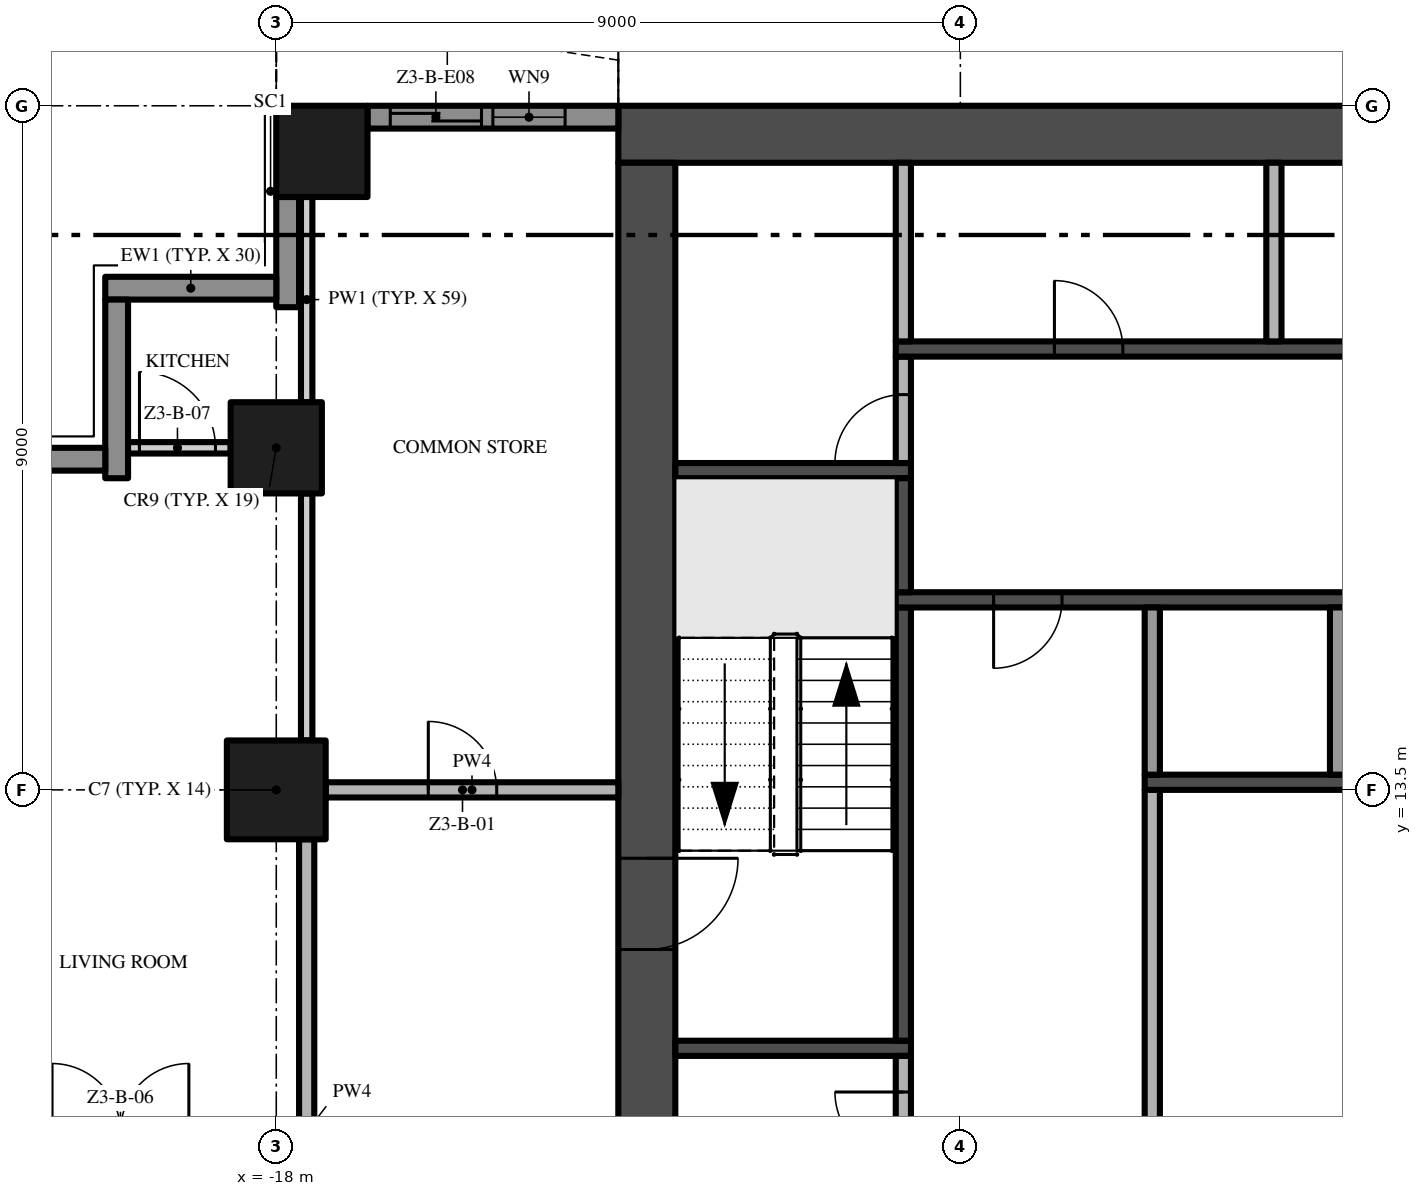
"""IFC4 building model, lengths in metres.
Left out: names, types, materials, properties, quantities, classifications, styles, units other than length and angle.
Written with IfcOpenShell. Run it as: python <this file> out.ifc"""

import sys

from ifc_helpers import new_model, si_unit, direction, frame, frame_2d, origin, origin_2d, place, context, subcontext, project, spatial, polyline, rectangle, outline, extrude, element, fill, save


model = new_model("IFC4")
c1 = context("Model", 3, precision=1e-05, world=origin(), true_north=direction((0.0, 1.0)))
c2 = subcontext(c1, "Body", "Model", "MODEL_VIEW")
j1 = project(units=[si_unit("LENGTHUNIT", "METRE"), si_unit("PLANEANGLEUNIT", "RADIAN")], contexts=[c1])
p1 = place(None, origin())
s1 = spatial("IfcSite", under=j1, at=p1, CompositionType="ELEMENT")
p2 = place(p1, origin())
s2 = spatial("IfcBuilding", under=s1, at=p2, CompositionType="ELEMENT")
p3 = place(p2, frame((0.0, 0.0, 136.4)))
s3 = spatial("IfcBuildingStorey", under=s2, at=p3, CompositionType="ELEMENT", Elevation=136.4)
p4 = place(p3, frame((13.5, 22.125, -0.3), z_axis=(0.0, 0.0, 1.0), x_axis=(-1.0, 0.0, 0.0)))
e1 = element("IfcWall", 1, at=p4, inside=s3, PredefinedType="SHEAR", context=c2, shape_type="SweptSolid", body=[
    extrude(rectangle(XDim=27.0, YDim=0.75, at=frame_2d((13.5, 0.0))), origin(), (0.0, 0.0, 1.0), 3.8),
])
p5 = place(p3, frame((-13.125, 21.75, -0.3), z_axis=(0.0, 0.0, 1.0), x_axis=(0.0, -1.0, 0.0)))
e2 = element("IfcWall", 2, at=p5, inside=s3, PredefinedType="SHEAR", context=c2, shape_type="SweptSolid", body=[
    extrude(rectangle(XDim=16.5, YDim=0.75, at=frame_2d((8.25, 0.0))), origin(), (0.0, 0.0, 1.0), 3.8),
])
p6 = place(p5, frame((9.15, 0.0, 0.3)))
e3 = element("IfcOpeningElement", 3, at=p6, cuts=e2, PredefinedType="OPENING", context=c2, shape_type="SweptSolid", body=[
    extrude(rectangle(XDim=1.2, YDim=2.2, at=frame_2d((0.6, 1.1))), frame((0.0, 0.385, 0.0), z_axis=(0.0, -1.0, 0.0), x_axis=(1.0, 0.0, 0.0)), (0.0, 0.0, 1.0), 0.77),
])
p7 = place(p3, frame((-18.0, 13.5, 0.0), z_axis=(0.0, 0.0, 1.0), x_axis=(1.0, 0.0, 0.0)))
e4 = element("IfcColumn", 4, at=p7, inside=s3, PredefinedType="COLUMN", context=c2, shape_type="SweptSolid", body=[
    extrude(rectangle(XDim=1.3, YDim=1.3, at=origin_2d()), origin(), (0.0, 0.0, 1.0), 3.5),
])
for number, where, z_axis, x_axis in (
    (5, (-17.4, 21.9, 0.0), (0.0, 0.0, 1.0), (1.0, 0.0, 0.0)),
    (6, (-18.0, 18.0, 0.0), (0.0, 0.0, 1.0), (1.0, 0.0, 0.0)),
):
    element("IfcColumn", number, at=place(p3, frame(where, z_axis=z_axis, x_axis=x_axis)), inside=s3, PredefinedType="COLUMN", context=c2, shape_type="SweptSolid", body=[
        extrude(rectangle(XDim=1.2, YDim=1.2, at=origin_2d()), origin(), (0.0, 0.0, 1.0), 3.5),
    ])
p8 = place(p3, frame((-16.8, 22.35, 0.0), z_axis=(0.0, 0.0, 1.0), x_axis=(1.0, 0.0, 0.0)))
e7 = element("IfcWall", 7, at=p8, inside=s3, PredefinedType="SOLIDWALL", context=c2, shape_type="SweptSolid", body=[
    extrude(rectangle(XDim=3.3, YDim=0.3, at=frame_2d((1.65, 0.0))), origin(), (0.0, 0.0, 1.0), 3.5),
])
p9 = place(p8, frame((1.65, 0.0, 0.45)))
e8 = element("IfcOpeningElement", 8, at=p9, cuts=e7, PredefinedType="OPENING", context=c2, shape_type="SweptSolid", body=[
    extrude(rectangle(XDim=0.95, YDim=2.65, at=frame_2d((0.475, 1.325))), frame((0.0, 0.16, 0.0), z_axis=(0.0, -1.0, 0.0), x_axis=(1.0, 0.0, 0.0)), (0.0, 0.0, 1.0), 0.32),
])
p10 = place(p8, frame((0.3, 0.0, 0.0)))
e9 = element("IfcOpeningElement", 9, at=p10, cuts=e7, PredefinedType="OPENING", context=c2, shape_type="SweptSolid", body=[
    extrude(rectangle(XDim=1.2, YDim=2.4, at=frame_2d((0.6, 1.2))), frame((0.0, 0.16, 0.0), z_axis=(0.0, -1.0, 0.0), x_axis=(1.0, 0.0, 0.0)), (0.0, 0.0, 1.0), 0.32),
])
p11 = place(p3, frame((-17.85, 19.85, 0.0), z_axis=(0.0, 0.0, 1.0), x_axis=(0.0, 1.0, 0.0)))
e10 = element("IfcWall", 10, at=p11, inside=s3, PredefinedType="SOLIDWALL", context=c2, shape_type="SweptSolid", body=[
    extrude(rectangle(XDim=1.45, YDim=0.3, at=frame_2d((0.725, 0.0))), origin(), (0.0, 0.0, 1.0), 3.5),
])
p12 = place(p3, frame((-20.25, 20.1, 0.0), z_axis=(0.0, 0.0, 1.0), x_axis=(1.0, 0.0, 0.0)))
e11 = element("IfcWall", 11, at=p12, inside=s3, PredefinedType="SOLIDWALL", context=c2, shape_type="SweptSolid", body=[
    extrude(rectangle(XDim=2.25, YDim=0.3, at=frame_2d((1.125, 0.0))), origin(), (0.0, 0.0, 1.0), 3.5),
])
p13 = place(p3, frame((-20.1, 17.6, 0.0), z_axis=(0.0, 0.0, 1.0), x_axis=(0.0, 1.0, 0.0)))
e12 = element("IfcWall", 12, at=p13, inside=s3, PredefinedType="SOLIDWALL", context=c2, shape_type="SweptSolid", body=[
    extrude(rectangle(XDim=2.35, YDim=0.3, at=frame_2d((1.175, 0.0))), origin(), (0.0, 0.0, 1.0), 3.5),
])
p14 = place(p3, frame((-22.5, 17.85, 0.0), z_axis=(0.0, 0.0, 1.0), x_axis=(1.0, 0.0, 0.0)))
e13 = element("IfcWall", 13, at=p14, inside=s3, PredefinedType="SOLIDWALL", context=c2, shape_type="SweptSolid", body=[
    extrude(rectangle(XDim=2.25, YDim=0.3, at=frame_2d((1.125, 0.0))), origin(), (0.0, 0.0, 1.0), 3.5),
])
p15 = place(p3, origin())
e14 = element("IfcWall", 14, at=p15, inside=s3, PredefinedType="USERDEFINED", context=c2, shape_type="SweptSolid", body=[
    extrude(outline(polyline([(-13.5, 23.1), (-15.0, 23.329), (-16.5, 23.929), (-18.0, 24.671), (-18.111, 24.447), (-16.602, 23.701), (-15.066, 23.086), (-13.538, 22.853), (-13.5, 23.1)])), origin(), (0.0, 0.0, 1.0), 0.9),
])
for number, where, z_axis, x_axis in (
    (15, (-12.75, 10.1, 0.0), (0.0, 0.0, 1.0), (1.0, 0.0, 0.0)),
    (16, (-12.75, 17.7, 0.0), (0.0, 0.0, 1.0), (1.0, 0.0, 0.0)),
):
    element("IfcWall", number, at=place(p3, frame(where, z_axis=z_axis, x_axis=x_axis)), inside=s3, PredefinedType="SHEAR", context=c2, shape_type="SweptSolid", body=[
        extrude(rectangle(XDim=3.1, YDim=0.2, at=frame_2d((1.55, 0.0))), origin(), (0.0, 0.0, 1.0), 3.5),
    ])
p16 = place(p3, frame((-9.75, 8.15, 0.0), z_axis=(0.0, 0.0, 1.0), x_axis=(0.0, 1.0, 0.0)))
e17 = element("IfcWall", 17, at=p16, inside=s3, PredefinedType="PARTITIONING", context=c2, shape_type="SweptSolid", body=[
    extrude(rectangle(XDim=1.85, YDim=0.2, at=frame_2d((0.925, 0.0))), origin(), (0.0, 0.0, 1.0), 3.5),
])
p17 = place(p16, frame((0.475, 0.0, 0.0)))
e18 = element("IfcOpeningElement", 18, at=p17, cuts=e17, PredefinedType="OPENING", context=c2, shape_type="SweptSolid", body=[
    extrude(rectangle(XDim=0.9, YDim=2.1, at=frame_2d((0.45, 1.05))), frame((0.0, 0.11, 0.0), z_axis=(0.0, -1.0, 0.0), x_axis=(1.0, 0.0, 0.0)), (0.0, 0.0, 1.0), 0.22),
])
p18 = place(p3, frame((-9.75, 10.2, 0.0), z_axis=(0.0, 0.0, 1.0), x_axis=(0.0, 1.0, 0.0)))
e19 = element("IfcWall", 19, at=p18, inside=s3, PredefinedType="SHEAR", context=c2, shape_type="SweptSolid", body=[
    extrude(rectangle(XDim=5.7, YDim=0.2, at=frame_2d((2.85, 0.0))), origin(), (0.0, 0.0, 1.0), 3.5),
])
p19 = place(p3, frame((-1.5, 16.0, 0.0), z_axis=(0.0, 0.0, 1.0), x_axis=(-1.0, 0.0, 0.0)))
e20 = element("IfcWall", 20, at=p19, inside=s3, PredefinedType="SHEAR", context=c2, shape_type="SweptSolid", body=[
    extrude(rectangle(XDim=8.35, YDim=0.2, at=frame_2d((4.175, 0.0))), origin(), (0.0, 0.0, 1.0), 3.5),
])
p20 = place(p19, frame((6.162, 0.0, 0.0)))
e21 = element("IfcOpeningElement", 21, at=p20, cuts=e20, PredefinedType="OPENING", context=c2, shape_type="SweptSolid", body=[
    extrude(rectangle(XDim=0.9, YDim=2.1, at=frame_2d((0.45, 1.05))), frame((0.0, 0.11, 0.0), z_axis=(0.0, -1.0, 0.0), x_axis=(1.0, 0.0, 0.0)), (0.0, 0.0, 1.0), 0.22),
])
p21 = place(p3, frame((-9.75, 16.1, 0.0), z_axis=(0.0, 0.0, 1.0), x_axis=(0.0, 1.0, 0.0)))
e22 = element("IfcWall", 22, at=p21, inside=s3, PredefinedType="SHEAR", context=c2, shape_type="SweptSolid", body=[
    extrude(rectangle(XDim=1.5, YDim=0.2, at=frame_2d((0.75, 0.0))), origin(), (0.0, 0.0, 1.0), 3.5),
])
p22 = place(p3, frame((-9.75, 17.8, 0.0), z_axis=(0.0, 0.0, 1.0), x_axis=(0.0, 1.0, 0.0)))
e23 = element("IfcWall", 23, at=p22, inside=s3, PredefinedType="PARTITIONING", context=c2, shape_type="SweptSolid", body=[
    extrude(rectangle(XDim=1.4, YDim=0.2, at=frame_2d((0.7, 0.0))), origin(), (0.0, 0.0, 1.0), 3.5),
])
p23 = place(p22, origin())
e24 = element("IfcOpeningElement", 24, at=p23, cuts=e23, PredefinedType="OPENING", context=c2, shape_type="SweptSolid", body=[
    extrude(rectangle(XDim=0.9, YDim=2.1, at=frame_2d((0.45, 1.05))), frame((0.0, 0.11, 0.0), z_axis=(0.0, -1.0, 0.0), x_axis=(1.0, 0.0, 0.0)), (0.0, 0.0, 1.0), 0.22),
])
p24 = place(p3, frame((-9.85, 19.3, 0.0), z_axis=(0.0, 0.0, 1.0), x_axis=(1.0, 0.0, 0.0)))
e25 = element("IfcWall", 25, at=p24, inside=s3, PredefinedType="SHEAR", context=c2, shape_type="SweptSolid", body=[
    extrude(rectangle(XDim=19.7, YDim=0.2, at=frame_2d((9.85, 0.0))), origin(), (0.0, 0.0, 1.0), 3.5),
])
p25 = place(p24, frame((10.519, 0.0, 0.0)))
e26 = element("IfcOpeningElement", 26, at=p25, cuts=e25, PredefinedType="OPENING", context=c2, shape_type="SweptSolid", body=[
    extrude(rectangle(XDim=1.1, YDim=2.1, at=frame_2d((0.55, 1.05))), frame((0.0, 0.11, 0.0), z_axis=(0.0, -1.0, 0.0), x_axis=(1.0, 0.0, 0.0)), (0.0, 0.0, 1.0), 0.22),
])
p26 = place(p24, frame((12.956, 0.0, 0.0)))
e27 = element("IfcOpeningElement", 27, at=p26, cuts=e25, PredefinedType="OPENING", context=c2, shape_type="SweptSolid", body=[
    extrude(rectangle(XDim=1.1, YDim=2.1, at=frame_2d((0.55, 1.05))), frame((0.0, 0.11, 0.0), z_axis=(0.0, -1.0, 0.0), x_axis=(1.0, 0.0, 0.0)), (0.0, 0.0, 1.0), 0.22),
])
p27 = place(p24, frame((15.394, 0.0, 0.0)))
e28 = element("IfcOpeningElement", 28, at=p27, cuts=e25, PredefinedType="OPENING", context=c2, shape_type="SweptSolid", body=[
    extrude(rectangle(XDim=1.1, YDim=2.1, at=frame_2d((0.55, 1.05))), frame((0.0, 0.11, 0.0), z_axis=(0.0, -1.0, 0.0), x_axis=(1.0, 0.0, 0.0)), (0.0, 0.0, 1.0), 0.22),
])
p28 = place(p24, frame((17.831, 0.0, 0.0)))
e29 = element("IfcOpeningElement", 29, at=p28, cuts=e25, PredefinedType="OPENING", context=c2, shape_type="SweptSolid", body=[
    extrude(rectangle(XDim=1.1, YDim=2.1, at=frame_2d((0.55, 1.05))), frame((0.0, 0.11, 0.0), z_axis=(0.0, -1.0, 0.0), x_axis=(1.0, 0.0, 0.0)), (0.0, 0.0, 1.0), 0.22),
])
p29 = place(p24, frame((2.087, 0.0, 0.0)))
e30 = element("IfcOpeningElement", 30, at=p29, cuts=e25, PredefinedType="OPENING", context=c2, shape_type="SweptSolid", body=[
    extrude(rectangle(XDim=0.9, YDim=2.1, at=frame_2d((0.45, 1.05))), frame((0.0, 0.11, 0.0), z_axis=(0.0, -1.0, 0.0), x_axis=(1.0, 0.0, 0.0)), (0.0, 0.0, 1.0), 0.22),
])
p30 = place(p24, frame((6.963, 0.0, 0.0)))
e31 = element("IfcOpeningElement", 31, at=p30, cuts=e25, PredefinedType="OPENING", context=c2, shape_type="SweptSolid", body=[
    extrude(rectangle(XDim=0.9, YDim=2.1, at=frame_2d((0.45, 1.05))), frame((0.0, 0.11, 0.0), z_axis=(0.0, -1.0, 0.0), x_axis=(1.0, 0.0, 0.0)), (0.0, 0.0, 1.0), 0.22),
])
p31 = place(p3, frame((-9.75, 19.4, 0.0), z_axis=(0.0, 0.0, 1.0), x_axis=(0.0, 1.0, 0.0)))
e32 = element("IfcWall", 32, at=p31, inside=s3, PredefinedType="PARTITIONING", context=c2, shape_type="SweptSolid", body=[
    extrude(rectangle(XDim=2.35, YDim=0.2, at=frame_2d((1.175, 0.0))), origin(), (0.0, 0.0, 1.0), 3.5),
])
p32 = place(p3, frame((-6.475, 8.15, 0.0), z_axis=(0.0, 0.0, 1.0), x_axis=(0.0, 1.0, 0.0)))
e33 = element("IfcWall", 33, at=p32, inside=s3, PredefinedType="PARTITIONING", context=c2, shape_type="SweptSolid", body=[
    extrude(rectangle(XDim=5.35, YDim=0.2, at=frame_2d((2.675, 0.0))), origin(), (0.0, 0.0, 1.0), 3.5),
])
p33 = place(p3, frame((-6.575, 13.6, 0.0), z_axis=(0.0, 0.0, 1.0), x_axis=(1.0, 0.0, 0.0)))
e34 = element("IfcWall", 34, at=p33, inside=s3, PredefinedType="SHEAR", context=c2, shape_type="SweptSolid", body=[
    extrude(rectangle(XDim=5.075, YDim=0.2, at=frame_2d((2.538, 0.0))), origin(), (0.0, 0.0, 1.0), 3.5),
])
p34 = place(p3, frame((-6.475, 13.7, 0.0), z_axis=(0.0, 0.0, 1.0), x_axis=(0.0, 1.0, 0.0)))
e35 = element("IfcWall", 35, at=p34, inside=s3, PredefinedType="PARTITIONING", context=c2, shape_type="SweptSolid", body=[
    extrude(rectangle(XDim=2.2, YDim=0.2, at=frame_2d((1.1, 0.0))), origin(), (0.0, 0.0, 1.0), 3.5),
])
p35 = place(p3, frame((-4.875, 19.4, 0.0), z_axis=(0.0, 0.0, 1.0), x_axis=(0.0, 1.0, 0.0)))
e36 = element("IfcWall", 36, at=p35, inside=s3, PredefinedType="PARTITIONING", context=c2, shape_type="SweptSolid", body=[
    extrude(rectangle(XDim=2.35, YDim=0.2, at=frame_2d((1.175, 0.0))), origin(), (0.0, 0.0, 1.0), 3.5),
])
p36 = place(p3, frame((-4.037, 13.7, 0.0), z_axis=(0.0, 0.0, 1.0), x_axis=(0.0, 1.0, 0.0)))
e37 = element("IfcWall", 37, at=p36, inside=s3, PredefinedType="PARTITIONING", context=c2, shape_type="SweptSolid", body=[
    extrude(rectangle(XDim=2.2, YDim=0.2, at=frame_2d((1.1, 0.0))), origin(), (0.0, 0.0, 1.0), 3.5),
])
p37 = place(p3, frame((-17.35, 13.5, 0.0), z_axis=(0.0, 0.0, 1.0), x_axis=(1.0, 0.0, 0.0)))
e38 = element("IfcWall", 38, at=p37, inside=s3, PredefinedType="PARTITIONING", context=c2, shape_type="SweptSolid", body=[
    extrude(rectangle(XDim=3.85, YDim=0.2, at=frame_2d((1.925, 0.0))), origin(), (0.0, 0.0, 1.0), 3.5),
])
p38 = place(p37, frame((1.35, 0.0, 0.0)))
e39 = element("IfcOpeningElement", 39, at=p38, cuts=e38, PredefinedType="OPENING", context=c2, shape_type="SweptSolid", body=[
    extrude(rectangle(XDim=0.9, YDim=2.1, at=frame_2d((0.45, 1.05))), frame((0.0, 0.11, 0.0), z_axis=(0.0, -1.0, 0.0), x_axis=(1.0, 0.0, 0.0)), (0.0, 0.0, 1.0), 0.22),
])
p39 = place(p3, frame((-19.95, 18.0, 0.0), z_axis=(0.0, 0.0, 1.0), x_axis=(1.0, 0.0, 0.0)))
e40 = element("IfcWall", 40, at=p39, inside=s3, PredefinedType="PARTITIONING", context=c2, shape_type="SweptSolid", body=[
    extrude(rectangle(XDim=1.35, YDim=0.15, at=frame_2d((0.675, 0.0))), origin(), (0.0, 0.0, 1.0), 3.5),
])
p40 = place(p39, frame((0.15, 0.0, 0.0)))
e41 = element("IfcOpeningElement", 41, at=p40, cuts=e40, PredefinedType="OPENING", context=c2, shape_type="SweptSolid", body=[
    extrude(rectangle(XDim=1.0, YDim=2.4, at=frame_2d((0.5, 1.2))), frame((0.0, 0.085, 0.0), z_axis=(0.0, -1.0, 0.0), x_axis=(1.0, 0.0, 0.0)), (0.0, 0.0, 1.0), 0.17),
])
p41 = place(p3, frame((-17.6, 5.15, 0.0), z_axis=(0.0, 0.0, 1.0), x_axis=(0.0, 1.0, 0.0)))
e42 = element("IfcWall", 42, at=p41, inside=s3, PredefinedType="PARTITIONING", context=c2, shape_type="SweptSolid", body=[
    extrude(rectangle(XDim=7.7, YDim=0.2, at=frame_2d((3.85, 0.0))), origin(), (0.0, 0.0, 1.0), 3.5),
])
p42 = place(p41, frame((1.0, 0.0, 0.0)))
e43 = element("IfcOpeningElement", 43, at=p42, cuts=e42, PredefinedType="OPENING", context=c2, shape_type="SweptSolid", body=[
    extrude(rectangle(XDim=1.2, YDim=2.4, at=frame_2d((0.6, 1.2))), frame((0.0, 0.11, 0.0), z_axis=(0.0, -1.0, 0.0), x_axis=(1.0, 0.0, 0.0)), (0.0, 0.0, 1.0), 0.22),
])
p43 = place(p3, frame((-17.6, 14.15, 0.0), z_axis=(0.0, 0.0, 1.0), x_axis=(0.0, 1.0, 0.0)))
e44 = element("IfcWall", 44, at=p43, inside=s3, PredefinedType="PARTITIONING", context=c2, shape_type="SweptSolid", body=[
    extrude(rectangle(XDim=3.25, YDim=0.15, at=frame_2d((1.625, 0.0))), origin(), (0.0, 0.0, 1.0), 3.5),
])
p44 = place(p3, frame((-17.6, 18.6, 0.0), z_axis=(0.0, 0.0, 1.0), x_axis=(0.0, 1.0, 0.0)))
e45 = element("IfcWall", 45, at=p44, inside=s3, PredefinedType="PARTITIONING", context=c2, shape_type="SweptSolid", body=[
    extrude(rectangle(XDim=2.7, YDim=0.15, at=frame_2d((1.35, 0.0))), origin(), (0.0, 0.0, 1.0), 3.5),
])
p45 = place(p9, origin())
e46 = element("IfcWindow", 46, at=p45, inside=s3, PartitioningType="SINGLE_PANEL", PredefinedType="WINDOW", context=c2, shape_type="SweptSolid", body=[
    extrude(rectangle(XDim=0.95, YDim=2.65, at=frame_2d((0.475, 1.325))), frame((0.0, 0.03, 0.0), z_axis=(0.0, -1.0, 0.0), x_axis=(1.0, 0.0, 0.0)), (0.0, 0.0, 1.0), 0.06),
])
fill(e8, e46)
p46 = place(p10, origin())
e47 = element("IfcDoor", 47, at=p46, inside=s3, OperationType="SINGLE_SWING_LEFT", PredefinedType="DOOR", context=c2, shape_type="SweptSolid", body=[
    extrude(rectangle(XDim=1.2, YDim=2.4, at=frame_2d((0.6, 1.2))), frame((0.0, 0.025, 0.0), z_axis=(0.0, -1.0, 0.0), x_axis=(1.0, 0.0, 0.0)), (0.0, 0.0, 1.0), 0.05),
])
fill(e9, e47)
p47 = place(p6, frame((1.2, 0.0, 0.0), z_axis=(0.0, 0.0, 1.0), x_axis=(-1.0, 0.0, 0.0)))
e48 = element("IfcDoor", 48, at=p47, inside=s3, OperationType="SINGLE_SWING_RIGHT", PredefinedType="DOOR", context=c2, shape_type="SweptSolid", body=[
    extrude(rectangle(XDim=1.2, YDim=2.2, at=frame_2d((0.6, 1.1))), frame((0.0, 0.025, 0.0), z_axis=(0.0, -1.0, 0.0), x_axis=(1.0, 0.0, 0.0)), (0.0, 0.0, 1.0), 0.05),
])
fill(e3, e48)
p48 = place(p20, origin())
e49 = element("IfcDoor", 49, at=p48, inside=s3, OperationType="SINGLE_SWING_RIGHT", PredefinedType="DOOR", context=c2, shape_type="SweptSolid", body=[
    extrude(rectangle(XDim=0.9, YDim=2.1, at=frame_2d((0.45, 1.05))), frame((0.0, 0.025, 0.0), z_axis=(0.0, -1.0, 0.0), x_axis=(1.0, 0.0, 0.0)), (0.0, 0.0, 1.0), 0.05),
])
fill(e21, e49)
p49 = place(p23, origin())
e50 = element("IfcDoor", 50, at=p49, inside=s3, OperationType="SINGLE_SWING_LEFT", PredefinedType="DOOR", context=c2, shape_type="SweptSolid", body=[
    extrude(rectangle(XDim=0.9, YDim=2.1, at=frame_2d((0.45, 1.05))), frame((0.0, 0.025, 0.0), z_axis=(0.0, -1.0, 0.0), x_axis=(1.0, 0.0, 0.0)), (0.0, 0.0, 1.0), 0.05),
])
fill(e24, e50)
p50 = place(p29, origin())
e51 = element("IfcDoor", 51, at=p50, inside=s3, OperationType="SINGLE_SWING_LEFT", PredefinedType="DOOR", context=c2, shape_type="SweptSolid", body=[
    extrude(rectangle(XDim=0.9, YDim=2.1, at=frame_2d((0.45, 1.05))), frame((0.0, 0.025, 0.0), z_axis=(0.0, -1.0, 0.0), x_axis=(1.0, 0.0, 0.0)), (0.0, 0.0, 1.0), 0.05),
])
fill(e30, e51)
p51 = place(p17, origin())
e52 = element("IfcDoor", 52, at=p51, inside=s3, OperationType="SINGLE_SWING_RIGHT", PredefinedType="DOOR", context=c2, shape_type="SweptSolid", body=[
    extrude(rectangle(XDim=0.9, YDim=2.1, at=frame_2d((0.45, 1.05))), frame((0.0, 0.025, 0.0), z_axis=(0.0, -1.0, 0.0), x_axis=(1.0, 0.0, 0.0)), (0.0, 0.0, 1.0), 0.05),
])
fill(e18, e52)
p52 = place(p38, origin())
e53 = element("IfcDoor", 53, at=p52, inside=s3, OperationType="SINGLE_SWING_LEFT", PredefinedType="DOOR", context=c2, shape_type="SweptSolid", body=[
    extrude(rectangle(XDim=0.9, YDim=2.1, at=frame_2d((0.45, 1.05))), frame((0.0, 0.025, 0.0), z_axis=(0.0, -1.0, 0.0), x_axis=(1.0, 0.0, 0.0)), (0.0, 0.0, 1.0), 0.05),
])
fill(e39, e53)
p53 = place(p40, origin())
e54 = element("IfcDoor", 54, at=p53, inside=s3, OperationType="SINGLE_SWING_LEFT", PredefinedType="DOOR", context=c2, shape_type="SweptSolid", body=[
    extrude(rectangle(XDim=1.0, YDim=2.4, at=frame_2d((0.5, 1.2))), frame((0.0, 0.025, 0.0), z_axis=(0.0, -1.0, 0.0), x_axis=(1.0, 0.0, 0.0)), (0.0, 0.0, 1.0), 0.05),
])
fill(e41, e54)
save(model, sys.argv[1])
